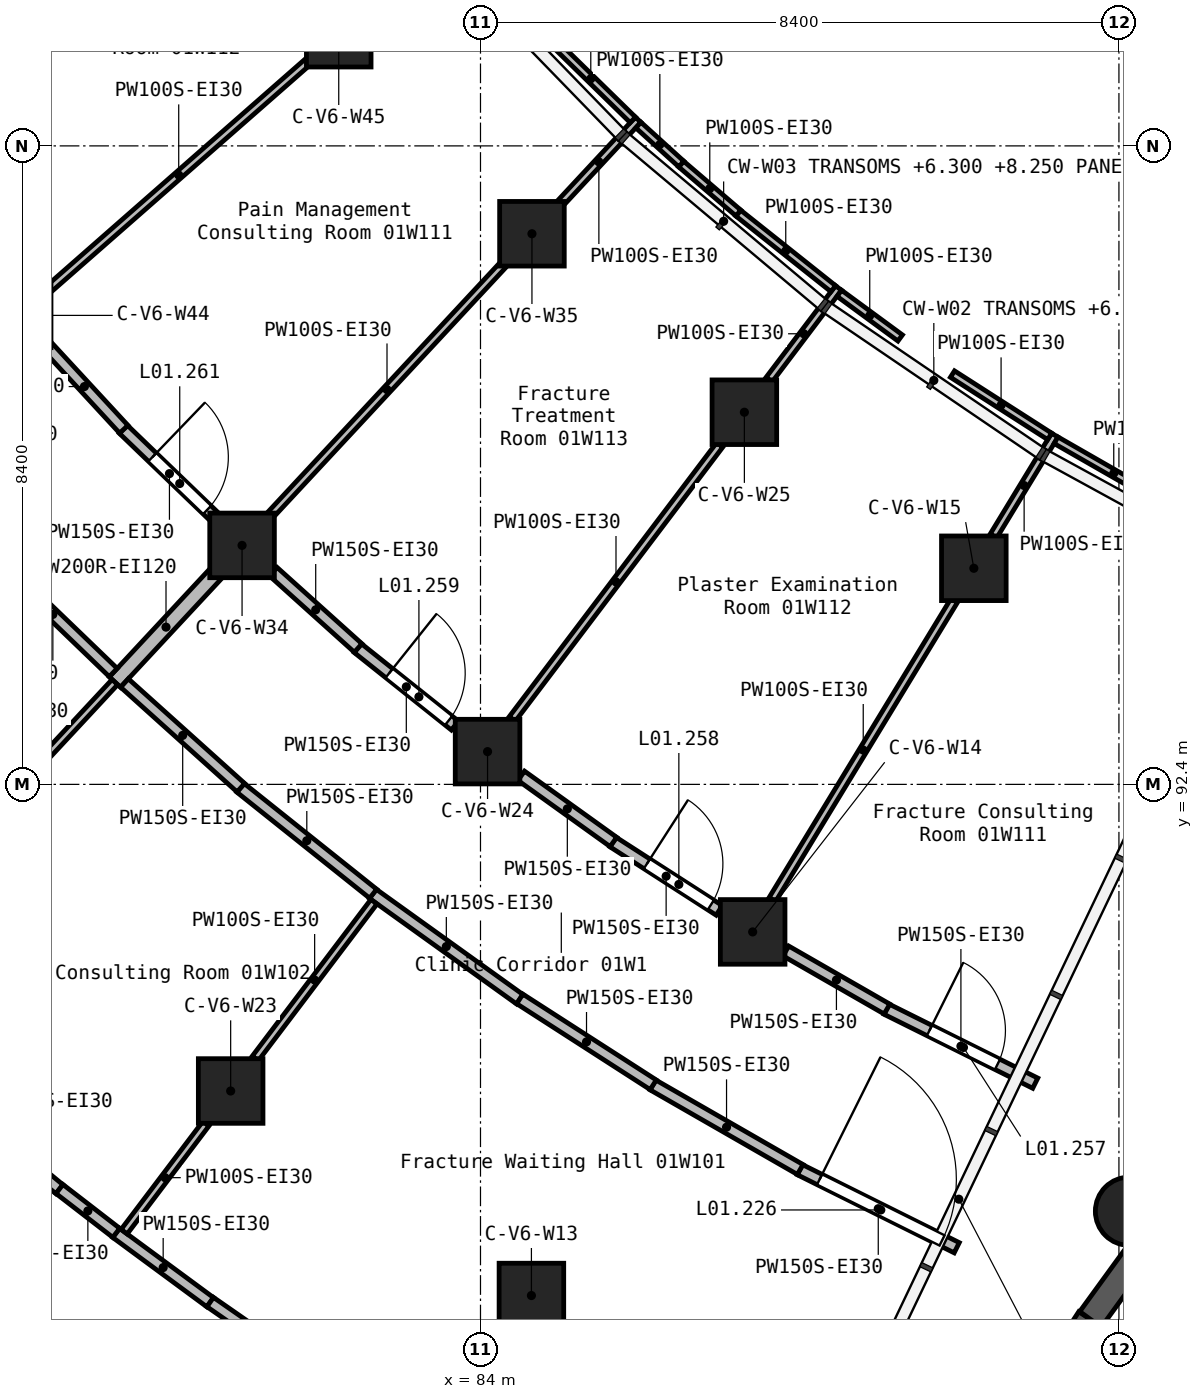
"""IFC4 building model, lengths in metres.
Left out: names, types, materials, properties, quantities, classifications, styles, units other than length and angle.
Written with IfcOpenShell. Run it as: python <this file> out.ifc"""

import sys

from ifc_helpers import new_model, si_unit, direction, frame, frame_2d, origin, origin_2d, place, context, subcontext, project, spatial, rectangle, circle, extrude, element, fill, save


model = new_model("IFC4")
c1 = context("Model", 3, precision=1e-05, world=origin(), true_north=direction((0.0, 1.0)))
c2 = subcontext(c1, "Body", "Model", "MODEL_VIEW")
j1 = project(units=[si_unit("LENGTHUNIT", "METRE"), si_unit("PLANEANGLEUNIT", "RADIAN")], contexts=[c1])
p1 = place(None, origin())
s1 = spatial("IfcSite", under=j1, at=p1, CompositionType="ELEMENT")
p2 = place(p1, origin())
s2 = spatial("IfcBuilding", under=s1, at=p2, CompositionType="ELEMENT")
p3 = place(p2, frame((0.0, 0.0, 5.4)))
s3 = spatial("IfcBuildingStorey", under=s2, at=p3, CompositionType="ELEMENT", Elevation=5.4)
for number, where, z_axis, x_axis in (
    (1, (80.713, 88.366, 0.0), (0.0, 0.0, 1.0), (1.0, 0.0, 0.0)),
    (2, (80.863, 95.544, 0.0), (0.0, 0.0, 1.0), (1.0, 0.0, 0.0)),
    (3, (82.135, 102.263, 0.0), (0.0, 0.0, 1.0), (1.0, 0.0, 0.0)),
    (4, (84.093, 92.831, 0.0), (0.0, 0.0, 1.0), (1.0, 0.0, 0.0)),
    (5, (84.67, 85.675, 0.0), (0.0, 0.0, 1.0), (1.0, 0.0, 0.0)),
    (6, (84.677, 99.644, 0.0), (0.0, 0.0, 1.0), (1.0, 0.0, 0.0)),
    (7, (87.472, 97.296, 0.0), (0.0, 0.0, 1.0), (1.0, 0.0, 0.0)),
    (8, (87.581, 90.459, 0.0), (0.0, 0.0, 1.0), (1.0, 0.0, 0.0)),
    (9, (90.491, 95.243, 0.0), (0.0, 0.0, 1.0), (1.0, 0.0, 0.0)),
):
    element("IfcColumn", number, at=place(p3, frame(where, z_axis=z_axis, x_axis=x_axis)), inside=s3, PredefinedType="COLUMN", context=c2, shape_type="SweptSolid", body=[
        extrude(rectangle(XDim=0.85, YDim=0.85, at=origin_2d()), origin(), (0.0, 0.0, 1.0), 4.5),
    ])
p4 = place(p3, frame((92.54, 86.784, 0.0), z_axis=(0.0, 0.0, 1.0), x_axis=(1.0, 0.0, 0.0)))
e10 = element("IfcColumn", 10, at=p4, inside=s3, PredefinedType="COLUMN", context=c2, shape_type="SweptSolid", body=[
    extrude(circle(Radius=0.45, at=origin_2d()), origin(), (0.0, 0.0, 1.0), 4.5),
])
p5 = place(p3, frame((91.776, 85.315, 0.0), z_axis=(0.0, 0.0, 1.0), x_axis=(0.838710342359, -0.544577782893, 0.0)))
e11 = element("IfcWall", 11, at=p5, inside=s3, PredefinedType="SHEAR", context=c2, shape_type="SweptSolid", body=[
    extrude(rectangle(XDim=3.951, YDim=0.35, at=frame_2d((1.976, 0.0))), origin(), (0.0, 0.0, 1.0), 4.5),
])
p6 = place(p3, frame((93.187, 86.958, 0.0), z_axis=(0.0, 0.0, 1.0), x_axis=(-0.588083467619, -0.808800244259, 0.0)))
e12 = element("IfcWall", 12, at=p6, inside=s3, PredefinedType="SHEAR", context=c2, shape_type="SweptSolid", body=[
    extrude(rectangle(XDim=1.974, YDim=0.35, at=frame_2d((0.987, 0.0))), origin(), (0.0, 0.0, 1.0), 4.5),
])
p7 = place(p3, frame((79.19, 93.746, 0.0), z_axis=(0.0, 0.0, 1.0), x_axis=(0.681171780306, 0.732123627344, 0.0)))
e13 = element("IfcWall", 13, at=p7, inside=s3, PredefinedType="SOLIDWALL", context=c2, shape_type="SweptSolid", body=[
    extrude(rectangle(XDim=1.974, YDim=0.2, at=frame_2d((0.987, 0.0))), origin(), (0.0, 0.0, 1.0), 4.15),
])
p8 = place(p3, frame((88.201, 87.331, 0.0), z_axis=(0.0, 0.0, 1.0), x_axis=(0.895335597875, -0.445392149883, 0.0)))
e14 = element("IfcWall", 14, at=p8, inside=s3, PredefinedType="PARTITIONING", context=c2, shape_type="SweptSolid", body=[
    extrude(rectangle(XDim=2.307, YDim=0.15, at=frame_2d((1.153, 0.0))), origin(), (0.0, 0.0, 1.0), 4.15),
])
p9 = place(p8, frame((0.291, 0.0, 0.0)))
e15 = element("IfcOpeningElement", 15, at=p9, cuts=e14, PredefinedType="OPENING", context=c2, shape_type="SweptSolid", body=[
    extrude(rectangle(XDim=1.8, YDim=2.1, at=frame_2d((0.9, 1.05))), frame((0.0, 0.085, 0.0), z_axis=(0.0, -1.0, 0.0), x_axis=(1.0, 0.0, 0.0)), (0.0, 0.0, 1.0), 0.17),
])
p10 = place(p3, frame((82.583, 90.961, 0.0), z_axis=(0.0, 0.0, 1.0), x_axis=(0.812456963848, -0.583021167622, 0.0)))
e16 = element("IfcWall", 16, at=p10, inside=s3, PredefinedType="PARTITIONING", context=c2, shape_type="SweptSolid", body=[
    extrude(rectangle(XDim=2.381, YDim=0.15, at=frame_2d((1.191, 0.0))), origin(), (0.0, 0.0, 1.0), 4.15),
])
p11 = place(p3, frame((80.841, 92.356, 0.0), z_axis=(0.0, 0.0, 1.0), x_axis=(0.781561025488, -0.62382879337, 0.0)))
e17 = element("IfcWall", 17, at=p11, inside=s3, PredefinedType="PARTITIONING", context=c2, shape_type="SweptSolid", body=[
    extrude(rectangle(XDim=2.235, YDim=0.15, at=frame_2d((1.118, 0.0))), origin(), (0.0, 0.0, 1.0), 4.15),
])
p12 = place(p3, frame((77.579, 95.4, 0.0), z_axis=(0.0, 0.0, 1.0), x_axis=(0.720594722174, -0.693356507415, 0.0)))
e18 = element("IfcWall", 18, at=p12, inside=s3, PredefinedType="PARTITIONING", context=c2, shape_type="SweptSolid", body=[
    extrude(rectangle(XDim=2.205, YDim=0.15, at=frame_2d((1.103, 0.0))), origin(), (0.0, 0.0, 1.0), 4.15),
])
p13 = place(p3, frame((86.268, 88.446, 0.0), z_axis=(0.0, 0.0, 1.0), x_axis=(0.867212921502, -0.497937494852, 0.0)))
e19 = element("IfcWall", 19, at=p13, inside=s3, PredefinedType="PARTITIONING", context=c2, shape_type="SweptSolid", body=[
    extrude(rectangle(XDim=2.235, YDim=0.15, at=frame_2d((1.118, 0.0))), origin(), (0.0, 0.0, 1.0), 4.15),
])
p14 = place(p3, frame((79.316, 93.733, 0.0), z_axis=(0.0, 0.0, 1.0), x_axis=(0.74346507851, -0.668774758073, 0.0)))
e20 = element("IfcWall", 20, at=p14, inside=s3, PredefinedType="PARTITIONING", context=c2, shape_type="SweptSolid", body=[
    extrude(rectangle(XDim=2.059, YDim=0.15, at=frame_2d((1.03, 0.0))), origin(), (0.0, 0.0, 1.0), 4.15),
])
p15 = place(p3, frame((84.517, 89.577, 0.0), z_axis=(0.0, 0.0, 1.0), x_axis=(0.840935250807, -0.541135753717, 0.0)))
e21 = element("IfcWall", 21, at=p15, inside=s3, PredefinedType="PARTITIONING", context=c2, shape_type="SweptSolid", body=[
    extrude(rectangle(XDim=2.088, YDim=0.15, at=frame_2d((1.044, 0.0))), origin(), (0.0, 0.0, 1.0), 4.15),
])
p16 = place(p3, frame((82.385, 94.194, 0.0), z_axis=(0.0, 0.0, 1.0), x_axis=(0.781756052881, -0.623584375833, 0.0)))
e22 = element("IfcWall", 22, at=p16, inside=s3, PredefinedType="PARTITIONING", context=c2, shape_type="SweptSolid", body=[
    extrude(rectangle(XDim=1.636, YDim=0.15, at=frame_2d((0.818, 0.0))), origin(), (0.0, 0.0, 1.0), 4.15),
])
p17 = place(p16, frame((0.53, 0.0, 0.0)))
e23 = element("IfcOpeningElement", 23, at=p17, cuts=e22, PredefinedType="OPENING", context=c2, shape_type="SweptSolid", body=[
    extrude(rectangle(XDim=1.0, YDim=2.1, at=frame_2d((0.5, 1.05))), frame((0.0, 0.085, 0.0), z_axis=(0.0, -1.0, 0.0), x_axis=(1.0, 0.0, 0.0)), (0.0, 0.0, 1.0), 0.17),
])
p18 = place(p3, frame((89.343, 89.442, 0.0), z_axis=(0.0, 0.0, 1.0), x_axis=(0.895274815557, -0.445514314731, 0.0)))
e24 = element("IfcWall", 24, at=p18, inside=s3, PredefinedType="PARTITIONING", context=c2, shape_type="SweptSolid", body=[
    extrude(rectangle(XDim=2.185, YDim=0.15, at=frame_2d((1.092, 0.0))), origin(), (0.0, 0.0, 1.0), 4.15),
])
p19 = place(p18, frame((0.63, 0.0, 0.0)))
e25 = element("IfcOpeningElement", 25, at=p19, cuts=e24, PredefinedType="OPENING", context=c2, shape_type="SweptSolid", body=[
    extrude(rectangle(XDim=1.0, YDim=2.1, at=frame_2d((0.5, 1.05))), frame((0.0, 0.085, 0.0), z_axis=(0.0, -1.0, 0.0), x_axis=(1.0, 0.0, 0.0)), (0.0, 0.0, 1.0), 0.17),
])
p20 = place(p3, frame((85.744, 91.642, 0.0), z_axis=(0.0, 0.0, 1.0), x_axis=(0.840848932624, -0.54126987031, 0.0)))
e26 = element("IfcWall", 26, at=p20, inside=s3, PredefinedType="PARTITIONING", context=c2, shape_type="SweptSolid", body=[
    extrude(rectangle(XDim=1.662, YDim=0.15, at=frame_2d((0.831, 0.0))), origin(), (0.0, 0.0, 1.0), 4.15),
])
p21 = place(p20, frame((0.53, 0.0, 0.0)))
e27 = element("IfcOpeningElement", 27, at=p21, cuts=e26, PredefinedType="OPENING", context=c2, shape_type="SweptSolid", body=[
    extrude(rectangle(XDim=1.0, YDim=2.1, at=frame_2d((0.5, 1.05))), frame((0.0, 0.085, 0.0), z_axis=(0.0, -1.0, 0.0), x_axis=(1.0, 0.0, 0.0)), (0.0, 0.0, 1.0), 0.17),
])
p22 = place(p3, frame((79.301, 97.072, 0.0), z_axis=(0.0, 0.0, 1.0), x_axis=(0.720465115712, -0.69349118022, 0.0)))
e28 = element("IfcWall", 28, at=p22, inside=s3, PredefinedType="PARTITIONING", context=c2, shape_type="SweptSolid", body=[
    extrude(rectangle(XDim=1.684, YDim=0.15, at=frame_2d((0.842, 0.0))), origin(), (0.0, 0.0, 1.0), 4.15),
])
p23 = place(p22, frame((0.53, 0.0, 0.0)))
e29 = element("IfcOpeningElement", 29, at=p23, cuts=e28, PredefinedType="OPENING", context=c2, shape_type="SweptSolid", body=[
    extrude(rectangle(XDim=1.0, YDim=2.1, at=frame_2d((0.5, 1.05))), frame((0.0, 0.085, 0.0), z_axis=(0.0, -1.0, 0.0), x_axis=(1.0, 0.0, 0.0)), (0.0, 0.0, 1.0), 0.17),
])
p24 = place(p3, frame((84.536, 92.513, 0.0), z_axis=(0.0, 0.0, 1.0), x_axis=(0.81243891359, -0.583046320359, 0.0)))
e30 = element("IfcWall", 30, at=p24, inside=s3, PredefinedType="PARTITIONING", context=c2, shape_type="SweptSolid", body=[
    extrude(rectangle(XDim=1.493, YDim=0.15, at=frame_2d((0.747, 0.0))), origin(), (0.0, 0.0, 1.0), 4.15),
])
p25 = place(p3, frame((78.27, 98.195, 0.0), z_axis=(0.0, 0.0, 1.0), x_axis=(0.678273469528, -0.73480956753, 0.0)))
e31 = element("IfcWall", 31, at=p25, inside=s3, PredefinedType="PARTITIONING", context=c2, shape_type="SweptSolid", body=[
    extrude(rectangle(XDim=1.529, YDim=0.15, at=frame_2d((0.764, 0.0))), origin(), (0.0, 0.0, 1.0), 4.15),
])
p26 = place(p3, frame((88.018, 90.208, 0.0), z_axis=(0.0, 0.0, 1.0), x_axis=(0.867174234795, -0.498004865947, 0.0)))
e32 = element("IfcWall", 32, at=p26, inside=s3, PredefinedType="PARTITIONING", context=c2, shape_type="SweptSolid", body=[
    extrude(rectangle(XDim=1.535, YDim=0.15, at=frame_2d((0.768, 0.0))), origin(), (0.0, 0.0, 1.0), 4.15),
])
p27 = place(p3, frame((81.273, 95.199, 0.0), z_axis=(0.0, 0.0, 1.0), x_axis=(0.743576936712, -0.668650386368, 0.0)))
e33 = element("IfcWall", 33, at=p27, inside=s3, PredefinedType="PARTITIONING", context=c2, shape_type="SweptSolid", body=[
    extrude(rectangle(XDim=1.502, YDim=0.15, at=frame_2d((0.751, 0.0))), origin(), (0.0, 0.0, 1.0), 4.15),
])
p28 = place(p3, frame((77.051, 88.236, 0.0), z_axis=(0.0, 0.0, 1.0), x_axis=(0.771517511576, -0.636208086502, 0.0)))
e34 = element("IfcWall", 34, at=p28, inside=s3, PredefinedType="PARTITIONING", context=c2, shape_type="SweptSolid", body=[
    extrude(rectangle(XDim=1.828, YDim=0.15, at=frame_2d((0.914, 0.0))), origin(), (0.0, 0.0, 1.0), 4.15),
])
p29 = place(p3, frame((79.206, 86.5, 0.0), z_axis=(0.0, 0.0, 1.0), x_axis=(0.804960127747, -0.593328907721, 0.0)))
e35 = element("IfcWall", 35, at=p29, inside=s3, PredefinedType="PARTITIONING", context=c2, shape_type="SweptSolid", body=[
    extrude(rectangle(XDim=1.539, YDim=0.15, at=frame_2d((0.77, 0.0))), origin(), (0.0, 0.0, 1.0), 4.15),
])
p30 = place(p3, frame((80.444, 85.589, 0.0), z_axis=(0.0, 0.0, 1.0), x_axis=(0.821096473197, -0.570789437274, 0.0)))
e36 = element("IfcWall", 36, at=p30, inside=s3, PredefinedType="PARTITIONING", context=c2, shape_type="SweptSolid", body=[
    extrude(rectangle(XDim=1.093, YDim=0.15, at=frame_2d((0.546, 0.0))), origin(), (0.0, 0.0, 1.0), 4.15),
])
p31 = place(p3, frame((78.46, 87.077, 0.0), z_axis=(0.0, 0.0, 1.0), x_axis=(0.791671493317, -0.610947008069, 0.0)))
e37 = element("IfcWall", 37, at=p31, inside=s3, PredefinedType="PARTITIONING", context=c2, shape_type="SweptSolid", body=[
    extrude(rectangle(XDim=0.944, YDim=0.15, at=frame_2d((0.472, 0.0))), origin(), (0.0, 0.0, 1.0), 4.15),
])
p32 = place(p3, frame((84.418, 93.26, 0.0), z_axis=(0.0, 0.0, 1.0), x_axis=(0.603501117064, 0.797362152163, 0.0)))
e38 = element("IfcWall", 38, at=p32, inside=s3, PredefinedType="PARTITIONING", context=c2, shape_type="SweptSolid", body=[
    extrude(rectangle(XDim=4.522, YDim=0.1, at=frame_2d((2.261, 0.0))), origin(), (0.0, 0.0, 1.0), 4.15),
])
p33 = place(p3, frame((87.798, 97.726, 0.0), z_axis=(0.0, 0.0, 1.0), x_axis=(0.603534256712, 0.797337068607, 0.0)))
e39 = element("IfcWall", 39, at=p33, inside=s3, PredefinedType="PARTITIONING", context=c2, shape_type="SweptSolid", body=[
    extrude(rectangle(XDim=1.512, YDim=0.1, at=frame_2d((0.756, 0.0))), origin(), (0.0, 0.0, 1.0), 4.15),
])
p34 = place(p3, frame((78.338, 98.933, 0.0), z_axis=(0.0, 0.0, 1.0), x_axis=(0.751823288541, 0.659364650863, 0.0)))
e40 = element("IfcWall", 40, at=p34, inside=s3, PredefinedType="PARTITIONING", context=c2, shape_type="SweptSolid", body=[
    extrude(rectangle(XDim=4.5, YDim=0.1, at=frame_2d((2.25, 0.0))), origin(), (0.0, 0.0, 1.0), 4.15),
])
p35 = place(p3, frame((87.84, 90.885, 0.0), z_axis=(0.0, 0.0, 1.0), x_axis=(0.519618801015, 0.854398210223, 0.0)))
e41 = element("IfcWall", 41, at=p35, inside=s3, PredefinedType="PARTITIONING", context=c2, shape_type="SweptSolid", body=[
    extrude(rectangle(XDim=4.603, YDim=0.1, at=frame_2d((2.302, 0.0))), origin(), (0.0, 0.0, 1.0), 4.15),
])
p36 = place(p3, frame((90.75, 95.668, 0.0), z_axis=(0.0, 0.0, 1.0), x_axis=(0.519552672181, 0.854438424247, 0.0)))
e42 = element("IfcWall", 42, at=p36, inside=s3, PredefinedType="PARTITIONING", context=c2, shape_type="SweptSolid", body=[
    extrude(rectangle(XDim=1.552, YDim=0.1, at=frame_2d((0.776, 0.0))), origin(), (0.0, 0.0, 1.0), 4.15),
])
p37 = place(p3, frame((81.227, 95.935, 0.0), z_axis=(0.0, 0.0, 1.0), x_axis=(0.681211440492, 0.732086725288, 0.0)))
e43 = element("IfcWall", 43, at=p37, inside=s3, PredefinedType="PARTITIONING", context=c2, shape_type="SweptSolid", body=[
    extrude(rectangle(XDim=4.53, YDim=0.1, at=frame_2d((2.265, 0.0))), origin(), (0.0, 0.0, 1.0), 4.15),
])
p38 = place(p3, frame((85.041, 100.034, 0.0), z_axis=(0.0, 0.0, 1.0), x_axis=(0.681296599079, 0.732007475428, 0.0)))
e44 = element("IfcWall", 44, at=p38, inside=s3, PredefinedType="PARTITIONING", context=c2, shape_type="SweptSolid", body=[
    extrude(rectangle(XDim=1.517, YDim=0.1, at=frame_2d((0.758, 0.0))), origin(), (0.0, 0.0, 1.0), 4.15),
])
p39 = place(p3, frame((77.412, 91.835, 0.0), z_axis=(0.0, 0.0, 1.0), x_axis=(0.681147107729, 0.732146582067, 0.0)))
e45 = element("IfcWall", 45, at=p39, inside=s3, PredefinedType="PARTITIONING", context=c2, shape_type="SweptSolid", body=[
    extrude(rectangle(XDim=2.609, YDim=0.1, at=frame_2d((1.304, 0.0))), origin(), (0.0, 0.0, 1.0), 4.15),
])
p40 = place(p3, frame((79.312, 86.515, 0.0), z_axis=(0.0, 0.0, 1.0), x_axis=(0.603588624137, 0.797295912954, 0.0)))
e46 = element("IfcWall", 46, at=p40, inside=s3, PredefinedType="PARTITIONING", context=c2, shape_type="SweptSolid", body=[
    extrude(rectangle(XDim=1.782, YDim=0.1, at=frame_2d((0.891, 0.0))), origin(), (0.0, 0.0, 1.0), 4.15),
])
p41 = place(p3, frame((81.038, 88.796, 0.0), z_axis=(0.0, 0.0, 1.0), x_axis=(0.603561177332, 0.797316690668, 0.0)))
e47 = element("IfcWall", 47, at=p41, inside=s3, PredefinedType="PARTITIONING", context=c2, shape_type="SweptSolid", body=[
    extrude(rectangle(XDim=2.584, YDim=0.1, at=frame_2d((1.292, 0.0))), origin(), (0.0, 0.0, 1.0), 4.15),
])
p42 = place(p3, frame((91.572, 96.928, 0.0), z_axis=(0.0, 0.0, 1.0), x_axis=(0.867607434085, -0.497249776591, 0.0)))
e48 = element("IfcWall", 48, at=p42, inside=s3, PredefinedType="PARTITIONING", context=c2, shape_type="SweptSolid", body=[
    extrude(rectangle(XDim=1.751, YDim=0.1, at=frame_2d((0.875, 0.0))), origin(), (0.0, 0.0, 1.0), 4.15),
])
p43 = place(p3, frame((87.391, 99.916, 0.0), z_axis=(0.0, 0.0, 1.0), x_axis=(0.7827431138, -0.622344934742, 0.0)))
e49 = element("IfcWall", 49, at=p43, inside=s3, PredefinedType="PARTITIONING", context=c2, shape_type="SweptSolid", body=[
    extrude(rectangle(XDim=1.598, YDim=0.1, at=frame_2d((0.799, 0.0))), origin(), (0.0, 0.0, 1.0), 4.15),
])
p44 = place(p3, frame((90.21, 97.798, 0.0), z_axis=(0.0, 0.0, 1.0), x_axis=(0.841976481819, -0.539514229713, 0.0)))
e50 = element("IfcWall", 50, at=p44, inside=s3, PredefinedType="PARTITIONING", context=c2, shape_type="SweptSolid", body=[
    extrude(rectangle(XDim=1.519, YDim=0.1, at=frame_2d((0.76, 0.0))), origin(), (0.0, 0.0, 1.0), 4.15),
])
p45 = place(p3, frame((84.897, 102.224, 0.0), z_axis=(0.0, 0.0, 1.0), x_axis=(0.715491637519, -0.698621297013, 0.0)))
e51 = element("IfcWall", 51, at=p45, inside=s3, PredefinedType="PARTITIONING", context=c2, shape_type="SweptSolid", body=[
    extrude(rectangle(XDim=1.548, YDim=0.1, at=frame_2d((0.774, 0.0))), origin(), (0.0, 0.0, 1.0), 4.15),
])
p46 = place(p3, frame((88.721, 98.861, 0.0), z_axis=(0.0, 0.0, 1.0), x_axis=(0.806061198055, -0.591832193269, 0.0)))
e52 = element("IfcWall", 52, at=p46, inside=s3, PredefinedType="PARTITIONING", context=c2, shape_type="SweptSolid", body=[
    extrude(rectangle(XDim=0.994, YDim=0.1, at=frame_2d((0.497, 0.0))), origin(), (0.0, 0.0, 1.0), 4.15),
])
p47 = place(p3, frame((86.64, 100.562, 0.0), z_axis=(0.0, 0.0, 1.0), x_axis=(0.759638737838, -0.650345283658, 0.0)))
e53 = element("IfcWall", 53, at=p47, inside=s3, PredefinedType="PARTITIONING", context=c2, shape_type="SweptSolid", body=[
    extrude(rectangle(XDim=0.992, YDim=0.1, at=frame_2d((0.496, 0.0))), origin(), (0.0, 0.0, 1.0), 4.15),
])
p48 = place(p3, frame((86.077, 101.074, 0.0), z_axis=(0.0, 0.0, 1.0), x_axis=(0.740693092669, -0.671843540173, 0.0)))
e54 = element("IfcWall", 54, at=p48, inside=s3, PredefinedType="PARTITIONING", context=c2, shape_type="SweptSolid", body=[
    extrude(rectangle(XDim=0.762, YDim=0.1, at=frame_2d((0.381, 0.0))), origin(), (0.0, 0.0, 1.0), 4.15),
])
p49 = place(p9, origin())
e55 = element("IfcDoor", 55, at=p49, inside=s3, OperationType="DOUBLE_DOOR_SINGLE_SWING", PredefinedType="DOOR", context=c2, shape_type="SweptSolid", body=[
    extrude(rectangle(XDim=1.8, YDim=2.1, at=frame_2d((0.9, 1.05))), frame((0.0, 0.025, 0.0), z_axis=(0.0, -1.0, 0.0), x_axis=(1.0, 0.0, 0.0)), (0.0, 0.0, 1.0), 0.05),
])
fill(e15, e55)
p50 = place(p19, origin())
e56 = element("IfcDoor", 56, at=p50, inside=s3, OperationType="SINGLE_SWING_RIGHT", PredefinedType="DOOR", context=c2, shape_type="SweptSolid", body=[
    extrude(rectangle(XDim=1.0, YDim=2.1, at=frame_2d((0.5, 1.05))), frame((0.0, 0.025, 0.0), z_axis=(0.0, -1.0, 0.0), x_axis=(1.0, 0.0, 0.0)), (0.0, 0.0, 1.0), 0.05),
])
fill(e25, e56)
p51 = place(p21, origin())
e57 = element("IfcDoor", 57, at=p51, inside=s3, OperationType="SINGLE_SWING_RIGHT", PredefinedType="DOOR", context=c2, shape_type="SweptSolid", body=[
    extrude(rectangle(XDim=1.0, YDim=2.1, at=frame_2d((0.5, 1.05))), frame((0.0, 0.025, 0.0), z_axis=(0.0, -1.0, 0.0), x_axis=(1.0, 0.0, 0.0)), (0.0, 0.0, 1.0), 0.05),
])
fill(e27, e57)
p52 = place(p17, origin())
e58 = element("IfcDoor", 58, at=p52, inside=s3, OperationType="SINGLE_SWING_RIGHT", PredefinedType="DOOR", context=c2, shape_type="SweptSolid", body=[
    extrude(rectangle(XDim=1.0, YDim=2.1, at=frame_2d((0.5, 1.05))), frame((0.0, 0.025, 0.0), z_axis=(0.0, -1.0, 0.0), x_axis=(1.0, 0.0, 0.0)), (0.0, 0.0, 1.0), 0.05),
])
fill(e23, e58)
p53 = place(p23, origin())
e59 = element("IfcDoor", 59, at=p53, inside=s3, OperationType="SINGLE_SWING_RIGHT", PredefinedType="DOOR", context=c2, shape_type="SweptSolid", body=[
    extrude(rectangle(XDim=1.0, YDim=2.1, at=frame_2d((0.5, 1.05))), frame((0.0, 0.025, 0.0), z_axis=(0.0, -1.0, 0.0), x_axis=(1.0, 0.0, 0.0)), (0.0, 0.0, 1.0), 0.05),
])
fill(e29, e59)
save(model, sys.argv[1])
